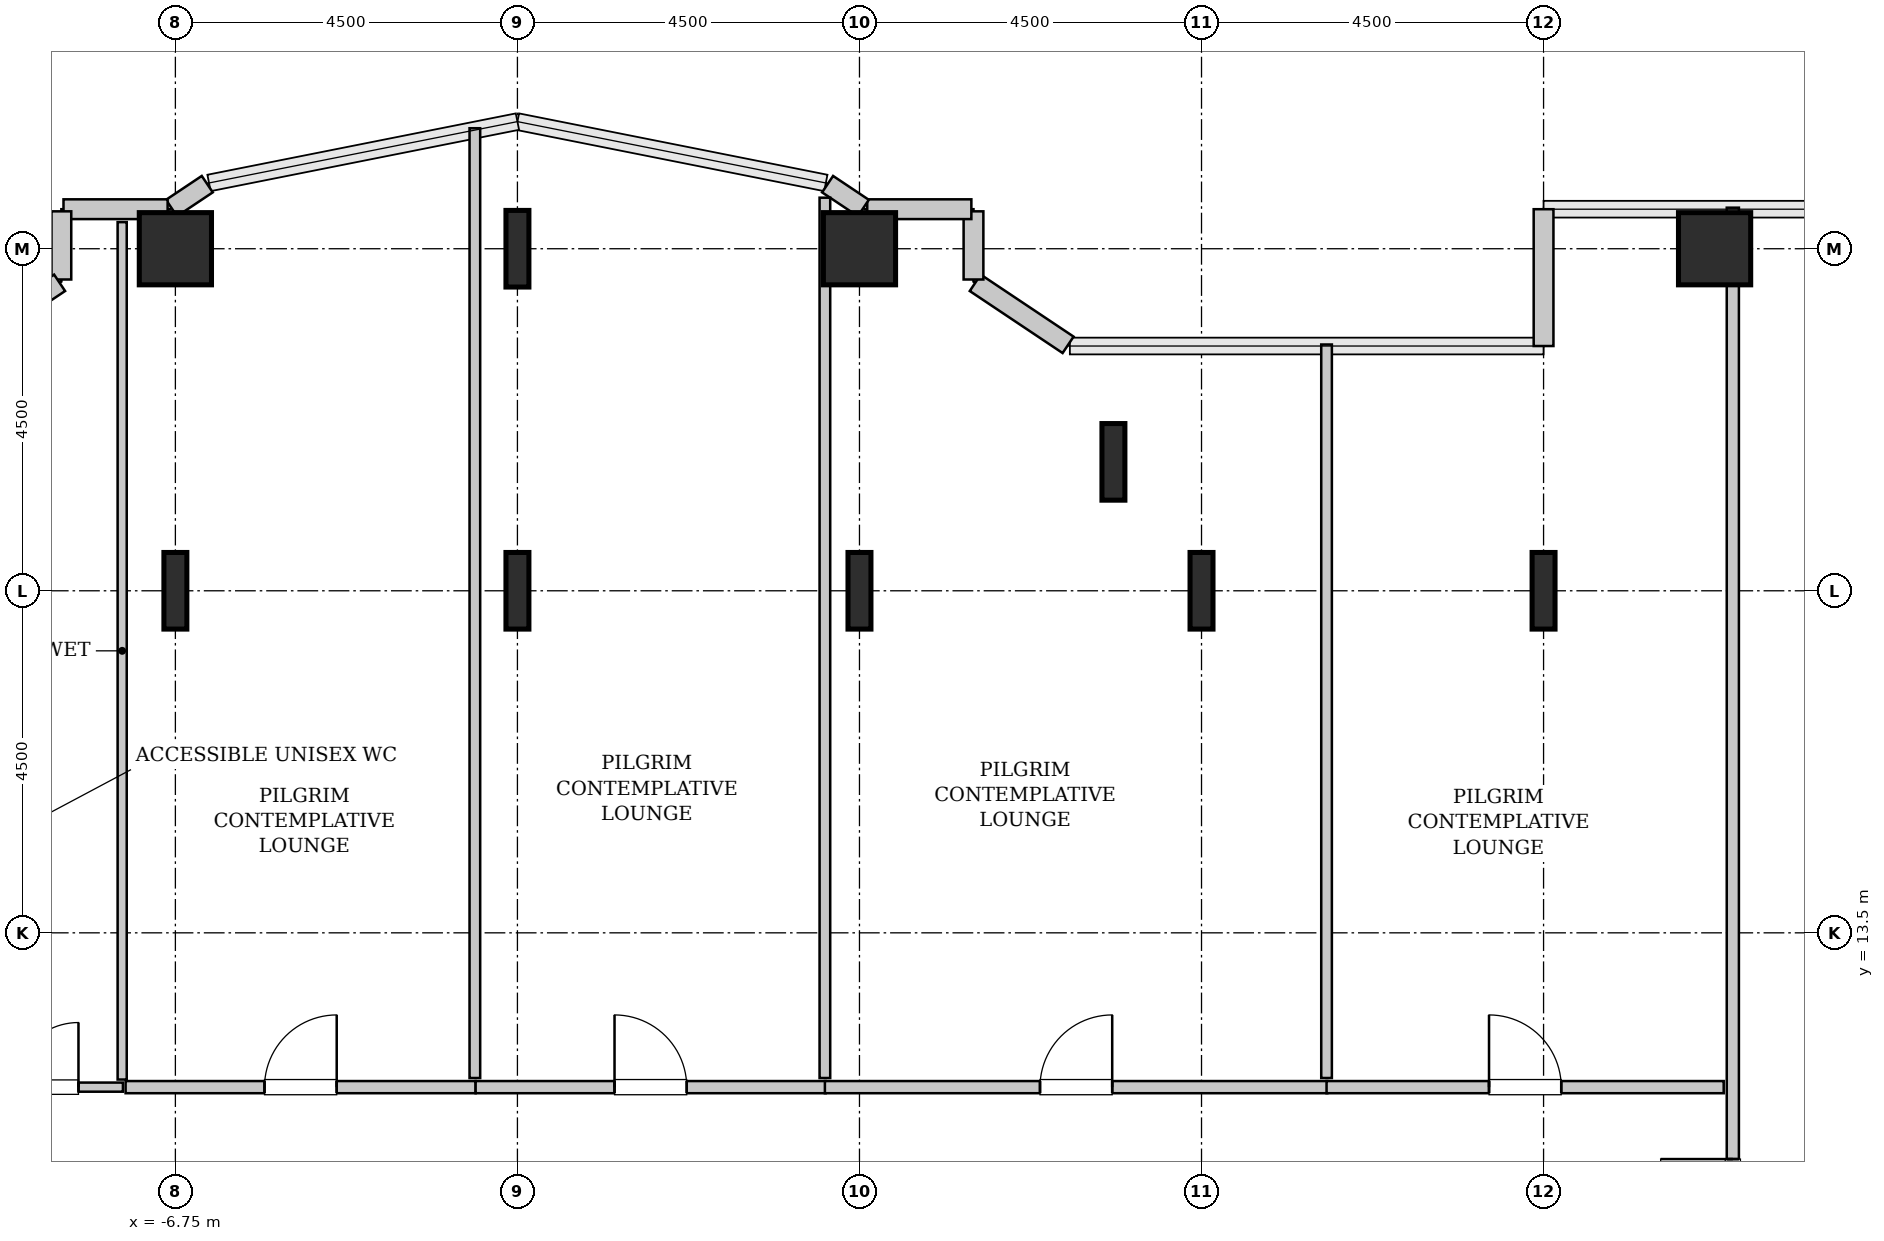
"""IFC4 building model, lengths in metres.
Left out: names, types, materials, properties, quantities, classifications, styles, units other than length and angle.
Written with IfcOpenShell. Run it as: python <this file> out.ifc"""

import sys

from ifc_helpers import new_model, si_unit, direction, frame, frame_2d, origin, origin_2d, place, context, subcontext, project, spatial, rectangle, hollow_rectangle, i_section, extrude, source, transform, mapped, element, fill, save


model = new_model("IFC4")
c1 = context("Model", 3, precision=1e-05, world=origin(), true_north=direction((0.0, 1.0)))
c2 = subcontext(c1, "Body", "Model", "MODEL_VIEW")
j1 = project(units=[si_unit("LENGTHUNIT", "METRE"), si_unit("PLANEANGLEUNIT", "RADIAN")], contexts=[c1])
p1 = place(None, origin())
s1 = spatial("IfcSite", under=j1, at=p1, CompositionType="ELEMENT")
p2 = place(p1, origin())
s2 = spatial("IfcBuilding", under=s1, at=p2, CompositionType="ELEMENT")
p3 = place(p2, frame((0.0, 0.0, 74.8)))
s3 = spatial("IfcBuildingStorey", under=s2, at=p3, CompositionType="ELEMENT", Elevation=74.8)
m1 = source(origin(), c2, "Body", "SweptSolid", [
    extrude(i_section(OverallWidth=0.302, OverallDepth=1.008, WebThickness=0.021, FlangeThickness=0.04, FilletRadius=0.03, at=origin_2d()), origin(), (0.0, 0.0, 1.0), 3.8),
])
p4 = place(p3, frame((-6.75, 18.0, 0.0), z_axis=(0.0, 0.0, 1.0), x_axis=(1.0, 0.0, 0.0)))
e1 = element("IfcColumn", 1, at=p4, inside=s3, PredefinedType="COLUMN", context=c2, shape_type="MappedRepresentation", body=[
    mapped(m1, transform((0.0, 0.0, 0.0), x_axis=(1.0, 0.0, 0.0), y_axis=(0.0, 1.0, 0.0), z_axis=(0.0, 0.0, 1.0), scale=1.0)),
])
m2 = source(origin(), c2, "Body", "SweptSolid", [
    extrude(hollow_rectangle(XDim=0.95, YDim=0.95, WallThickness=0.045, InnerFilletRadius=0.045, OuterFilletRadius=0.09, at=origin_2d()), origin(), (0.0, 0.0, 1.0), 3.8),
])
p5 = place(p3, frame((-6.75, 22.5, 0.0), z_axis=(0.0, 0.0, 1.0), x_axis=(1.0, 0.0, 0.0)))
e2 = element("IfcColumn", 2, at=p5, inside=s3, PredefinedType="COLUMN", context=c2, shape_type="MappedRepresentation", body=[
    mapped(m2, transform((0.0, 0.0, 0.0), x_axis=(1.0, 0.0, 0.0), y_axis=(0.0, 1.0, 0.0), z_axis=(0.0, 0.0, 1.0), scale=1.0)),
])
for number, where, z_axis, x_axis in (
    (3, (-2.25, 18.0, 0.0), (0.0, 0.0, 1.0), (1.0, 0.0, 0.0)),
    (4, (-2.25, 22.5, 0.0), (0.0, 0.0, 1.0), (1.0, 0.0, 0.0)),
    (5, (2.25, 18.0, 0.0), (0.0, 0.0, 1.0), (1.0, 0.0, 0.0)),
):
    element("IfcColumn", number, at=place(p3, frame(where, z_axis=z_axis, x_axis=x_axis)), inside=s3, PredefinedType="COLUMN", context=c2, shape_type="MappedRepresentation", body=[
        mapped(m1, transform((0.0, 0.0, 0.0), x_axis=(1.0, 0.0, 0.0), y_axis=(0.0, 1.0, 0.0), z_axis=(0.0, 0.0, 1.0), scale=1.0)),
    ])
p6 = place(p3, frame((2.25, 22.5, 0.0), z_axis=(0.0, 0.0, 1.0), x_axis=(1.0, 0.0, 0.0)))
e6 = element("IfcColumn", 6, at=p6, inside=s3, PredefinedType="COLUMN", context=c2, shape_type="MappedRepresentation", body=[
    mapped(m2, transform((0.0, 0.0, 0.0), x_axis=(1.0, 0.0, 0.0), y_axis=(0.0, 1.0, 0.0), z_axis=(0.0, 0.0, 1.0), scale=1.0)),
])
for number, where, z_axis, x_axis in (
    (7, (5.591, 19.696, 0.0), (0.0, 0.0, 1.0), (1.0, 0.0, 0.0)),
    (8, (6.75, 18.0, 0.0), (0.0, 0.0, 1.0), (1.0, 0.0, 0.0)),
    (9, (11.25, 18.0, 0.0), (0.0, 0.0, 1.0), (1.0, 0.0, 0.0)),
):
    element("IfcColumn", number, at=place(p3, frame(where, z_axis=z_axis, x_axis=x_axis)), inside=s3, PredefinedType="COLUMN", context=c2, shape_type="MappedRepresentation", body=[
        mapped(m1, transform((0.0, 0.0, 0.0), x_axis=(1.0, 0.0, 0.0), y_axis=(0.0, 1.0, 0.0), z_axis=(0.0, 0.0, 1.0), scale=1.0)),
    ])
p7 = place(p3, frame((13.5, 22.5, 0.0), z_axis=(0.0, 0.0, 1.0), x_axis=(1.0, 0.0, 0.0)))
e10 = element("IfcColumn", 10, at=p7, inside=s3, PredefinedType="COLUMN", context=c2, shape_type="MappedRepresentation", body=[
    mapped(m2, transform((0.0, 0.0, 0.0), x_axis=(1.0, 0.0, 0.0), y_axis=(0.0, 1.0, 0.0), z_axis=(0.0, 0.0, 1.0), scale=1.0)),
])
m3 = source(origin(), c2, "Body", "SweptSolid", [
    extrude(rectangle(XDim=1.8, YDim=0.26, at=frame_2d((0.9, 0.0))), origin(), (0.0, 0.0, 1.0), 3.55),
])
p8 = place(p3, frame((11.25, 23.02, 0.0), z_axis=(0.0, 0.0, 1.0), x_axis=(0.0, -1.0, 0.0)))
e11 = element("IfcWall", 11, at=p8, inside=s3, PredefinedType="SOLIDWALL", context=c2, shape_type="MappedRepresentation", body=[
    mapped(m3, transform((0.0, 0.0, 0.0), x_axis=(1.0, 0.0, 0.0), y_axis=(0.0, 1.0, 0.0), z_axis=(0.0, 0.0, 1.0), scale=1.0)),
])
m4 = source(origin(), c2, "Body", "SweptSolid", [
    extrude(rectangle(XDim=1.469, YDim=0.26, at=frame_2d((0.734, 0.0))), origin(), (0.0, 0.0, 1.0), 3.55),
])
p9 = place(p3, frame((4.995, 21.236, 0.0), z_axis=(0.0, 0.0, 1.0), x_axis=(-0.831461760506, 0.555581983884, 0.0)))
e12 = element("IfcWall", 12, at=p9, inside=s3, PredefinedType="SOLIDWALL", context=c2, shape_type="MappedRepresentation", body=[
    mapped(m4, transform((0.0, 0.0, 0.0), x_axis=(1.0, 0.0, 0.0), y_axis=(0.0, 1.0, 0.0), z_axis=(0.0, 0.0, 1.0), scale=1.0)),
])
m5 = source(origin(), c2, "Body", "SweptSolid", [
    extrude(rectangle(XDim=0.897, YDim=0.26, at=frame_2d((0.448, 0.0))), origin(), (0.0, 0.0, 1.0), 3.55),
])
p10 = place(p3, frame((3.75, 22.095, 0.0), z_axis=(0.0, 0.0, 1.0), x_axis=(0.0, 1.0, 0.0)))
e13 = element("IfcWall", 13, at=p10, inside=s3, PredefinedType="SOLIDWALL", context=c2, shape_type="MappedRepresentation", body=[
    mapped(m5, transform((0.0, 0.0, 0.0), x_axis=(1.0, 0.0, 0.0), y_axis=(0.0, 1.0, 0.0), z_axis=(0.0, 0.0, 1.0), scale=1.0)),
])
m6 = source(origin(), c2, "Body", "SweptSolid", [
    extrude(rectangle(XDim=1.37, YDim=0.26, at=frame_2d((0.685, 0.0))), origin(), (0.0, 0.0, 1.0), 3.55),
])
p11 = place(p3, frame((3.722, 23.02, 0.0), z_axis=(0.0, 0.0, 1.0), x_axis=(-1.0, 0.0, 0.0)))
e14 = element("IfcWall", 14, at=p11, inside=s3, PredefinedType="SOLIDWALL", context=c2, shape_type="MappedRepresentation", body=[
    mapped(m6, transform((0.0, 0.0, 0.0), x_axis=(1.0, 0.0, 0.0), y_axis=(0.0, 1.0, 0.0), z_axis=(0.0, 0.0, 1.0), scale=1.0)),
])
m7 = source(origin(), c2, "Body", "SweptSolid", [
    extrude(rectangle(XDim=0.565, YDim=0.26, at=frame_2d((0.283, 0.0))), origin(), (0.0, 0.0, 1.0), 3.55),
])
for number, where, z_axis, x_axis in (
    (15, (2.301, 23.036, 0.0), (0.0, 0.0, 1.0), (-0.832, 0.555, 0.0)),
    (16, (-6.331, 23.35, 0.0), (0.0, 0.0, 1.0), (-0.832, -0.555, 0.0)),
):
    element("IfcWall", number, at=place(p3, frame(where, z_axis=z_axis, x_axis=x_axis)), inside=s3, PredefinedType="SOLIDWALL", context=c2, shape_type="MappedRepresentation", body=[
        mapped(m7, transform((0.0, 0.0, 0.0), x_axis=(1.0, 0.0, 0.0), y_axis=(0.0, 1.0, 0.0), z_axis=(0.0, 0.0, 1.0), scale=1.0)),
    ])
p12 = place(p3, frame((-6.852, 23.02, 0.0), z_axis=(0.0, 0.0, 1.0), x_axis=(-1.0, 0.0, 0.0)))
e17 = element("IfcWall", 17, at=p12, inside=s3, PredefinedType="SOLIDWALL", context=c2, shape_type="MappedRepresentation", body=[
    mapped(m6, transform((0.0, 0.0, 0.0), x_axis=(1.0, 0.0, 0.0), y_axis=(0.0, 1.0, 0.0), z_axis=(0.0, 0.0, 1.0), scale=1.0)),
])
p13 = place(p3, frame((-8.25, 22.992, 0.0), z_axis=(0.0, 0.0, 1.0), x_axis=(0.0, -1.0, 0.0)))
e18 = element("IfcWall", 18, at=p13, inside=s3, PredefinedType="SOLIDWALL", context=c2, shape_type="MappedRepresentation", body=[
    mapped(m5, transform((0.0, 0.0, 0.0), x_axis=(1.0, 0.0, 0.0), y_axis=(0.0, 1.0, 0.0), z_axis=(0.0, 0.0, 1.0), scale=1.0)),
])
p14 = place(p3, frame((-8.273, 22.052, 0.0), z_axis=(0.0, 0.0, 1.0), x_axis=(-0.831461760506, -0.555581983884, 0.0)))
e19 = element("IfcWall", 19, at=p14, inside=s3, PredefinedType="SOLIDWALL", context=c2, shape_type="MappedRepresentation", body=[
    mapped(m4, transform((0.0, 0.0, 0.0), x_axis=(1.0, 0.0, 0.0), y_axis=(0.0, 1.0, 0.0), z_axis=(0.0, 0.0, 1.0), scale=1.0)),
])
m8 = source(origin(), c2, "Body", "SweptSolid", [
    extrude(rectangle(XDim=2.02, YDim=0.12, at=frame_2d((1.01, 0.0))), origin(), (0.0, 0.0, 1.0), 3.535),
])
p15 = place(p3, frame((-9.46, 11.47, 0.0), z_axis=(0.0, 0.0, 1.0), x_axis=(1.0, 0.0, 0.0)))
e20 = element("IfcWall", 20, at=p15, inside=s3, PredefinedType="PLUMBINGWALL", context=c2, shape_type="MappedRepresentation", body=[
    mapped(m8, transform((0.0, 0.0, 0.0), x_axis=(1.0, 0.0, 0.0), y_axis=(0.0, 1.0, 0.0), z_axis=(0.0, 0.0, 1.0), scale=1.0)),
])
p16 = place(p15, frame((0.585, 0.0, 0.0)))
e21 = element("IfcOpeningElement", 21, at=p16, cuts=e20, PredefinedType="OPENING", context=c2, shape_type="SweptSolid", body=[
    extrude(rectangle(XDim=0.85, YDim=2.1, at=frame_2d((0.425, 1.05))), frame((0.0, 0.07, 0.0), z_axis=(0.0, -1.0, 0.0), x_axis=(1.0, 0.0, 0.0)), (0.0, 0.0, 1.0), 0.14),
])
m9 = source(origin(), c2, "Body", "SweptSolid", [
    extrude(rectangle(XDim=11.28, YDim=0.12, at=frame_2d((5.64, 0.0))), origin(), (0.0, 0.0, 1.0), 3.535),
])
p17 = place(p3, frame((-7.45, 11.57, 0.0), z_axis=(0.0, 0.0, 1.0), x_axis=(0.0, 1.0, 0.0)))
e22 = element("IfcWall", 22, at=p17, inside=s3, PredefinedType="PLUMBINGWALL", context=c2, shape_type="MappedRepresentation", body=[
    mapped(m9, transform((0.0, 0.0, 0.0), x_axis=(1.0, 0.0, 0.0), y_axis=(0.0, 1.0, 0.0), z_axis=(0.0, 0.0, 1.0), scale=1.0)),
])
m10 = source(origin(), c2, "Body", "SweptSolid", [
    extrude(rectangle(XDim=14.453, YDim=0.16, at=frame_2d((7.226, 0.0))), origin(), (0.0, 0.0, 1.0), 3.535),
])
p18 = place(p3, frame((13.74, 8.587, 0.0), z_axis=(0.0, 0.0, 1.0), x_axis=(0.0, 1.0, 0.0)))
e23 = element("IfcWall", 23, at=p18, inside=s3, PredefinedType="PARTITIONING", context=c2, shape_type="MappedRepresentation", body=[
    mapped(m10, transform((0.0, 0.0, 0.0), x_axis=(1.0, 0.0, 0.0), y_axis=(0.0, 1.0, 0.0), z_axis=(0.0, 0.0, 1.0), scale=1.0)),
])
p19 = place(p18, frame((0.986, 0.0, 0.0)))
e24 = element("IfcOpeningElement", 24, at=p19, cuts=e23, PredefinedType="OPENING", context=c2, shape_type="SweptSolid", body=[
    extrude(rectangle(XDim=0.95, YDim=2.1, at=frame_2d((0.475, 1.05))), frame((0.0, 0.09, 0.0), z_axis=(0.0, -1.0, 0.0), x_axis=(1.0, 0.0, 0.0)), (0.0, 0.0, 1.0), 0.18),
])
m11 = source(origin(), c2, "Body", "SweptSolid", [
    extrude(rectangle(XDim=4.605, YDim=0.16, at=frame_2d((2.302, 0.0))), origin(), (0.0, 0.0, 1.0), 3.535),
])
p20 = place(p3, frame((-7.405, 11.47, 0.0), z_axis=(0.0, 0.0, 1.0), x_axis=(1.0, 0.0, 0.0)))
e25 = element("IfcWall", 25, at=p20, inside=s3, PredefinedType="PARTITIONING", context=c2, shape_type="MappedRepresentation", body=[
    mapped(m11, transform((0.0, 0.0, 0.0), x_axis=(1.0, 0.0, 0.0), y_axis=(0.0, 1.0, 0.0), z_axis=(0.0, 0.0, 1.0), scale=1.0)),
])
p21 = place(p20, frame((1.827, 0.0, 0.0)))
e26 = element("IfcOpeningElement", 26, at=p21, cuts=e25, PredefinedType="OPENING", context=c2, shape_type="SweptSolid", body=[
    extrude(rectangle(XDim=0.95, YDim=2.1, at=frame_2d((0.475, 1.05))), frame((0.0, 0.09, 0.0), z_axis=(0.0, -1.0, 0.0), x_axis=(1.0, 0.0, 0.0)), (0.0, 0.0, 1.0), 0.18),
])
m12 = source(origin(), c2, "Body", "SweptSolid", [
    extrude(rectangle(XDim=12.495, YDim=0.14, at=frame_2d((6.248, 0.0))), origin(), (0.0, 0.0, 1.0), 3.535),
])
p22 = place(p3, frame((-2.81, 11.59, 0.0), z_axis=(0.0, 0.0, 1.0), x_axis=(0.0, 1.0, 0.0)))
e27 = element("IfcWall", 27, at=p22, inside=s3, PredefinedType="PARTITIONING", context=c2, shape_type="MappedRepresentation", body=[
    mapped(m12, transform((0.0, 0.0, 0.0), x_axis=(1.0, 0.0, 0.0), y_axis=(0.0, 1.0, 0.0), z_axis=(0.0, 0.0, 1.0), scale=1.0)),
])
p23 = place(p3, frame((-2.8, 11.47, 0.0), z_axis=(0.0, 0.0, 1.0), x_axis=(1.0, 0.0, 0.0)))
e28 = element("IfcWall", 28, at=p23, inside=s3, PredefinedType="PARTITIONING", context=c2, shape_type="MappedRepresentation", body=[
    mapped(m11, transform((0.0, 0.0, 0.0), x_axis=(1.0, 0.0, 0.0), y_axis=(0.0, 1.0, 0.0), z_axis=(0.0, 0.0, 1.0), scale=1.0)),
])
p24 = place(p23, frame((1.827, 0.0, 0.0)))
e29 = element("IfcOpeningElement", 29, at=p24, cuts=e28, PredefinedType="OPENING", context=c2, shape_type="SweptSolid", body=[
    extrude(rectangle(XDim=0.95, YDim=2.1, at=frame_2d((0.475, 1.05))), frame((0.0, 0.09, 0.0), z_axis=(0.0, -1.0, 0.0), x_axis=(1.0, 0.0, 0.0)), (0.0, 0.0, 1.0), 0.18),
])
m13 = source(origin(), c2, "Body", "SweptSolid", [
    extrude(rectangle(XDim=11.581, YDim=0.14, at=frame_2d((5.791, 0.0))), origin(), (0.0, 0.0, 1.0), 2.825),
])
p25 = place(p3, frame((1.795, 11.59, 0.0), z_axis=(0.0, 0.0, 1.0), x_axis=(0.0, 1.0, 0.0)))
e30 = element("IfcWall", 30, at=p25, inside=s3, PredefinedType="PARTITIONING", context=c2, shape_type="MappedRepresentation", body=[
    mapped(m13, transform((0.0, 0.0, 0.0), x_axis=(1.0, 0.0, 0.0), y_axis=(0.0, 1.0, 0.0), z_axis=(0.0, 0.0, 1.0), scale=1.0)),
])
m14 = source(origin(), c2, "Body", "SweptSolid", [
    extrude(rectangle(XDim=6.61, YDim=0.16, at=frame_2d((3.305, 0.0))), origin(), (0.0, 0.0, 1.0), 3.535),
])
p26 = place(p3, frame((1.795, 11.47, 0.0), z_axis=(0.0, 0.0, 1.0), x_axis=(1.0, 0.0, 0.0)))
e31 = element("IfcWall", 31, at=p26, inside=s3, PredefinedType="PARTITIONING", context=c2, shape_type="MappedRepresentation", body=[
    mapped(m14, transform((0.0, 0.0, 0.0), x_axis=(1.0, 0.0, 0.0), y_axis=(0.0, 1.0, 0.0), z_axis=(0.0, 0.0, 1.0), scale=1.0)),
])
p27 = place(p26, frame((2.83, 0.0, 0.0)))
e32 = element("IfcOpeningElement", 32, at=p27, cuts=e31, PredefinedType="OPENING", context=c2, shape_type="SweptSolid", body=[
    extrude(rectangle(XDim=0.95, YDim=2.1, at=frame_2d((0.475, 1.05))), frame((0.0, 0.09, 0.0), z_axis=(0.0, -1.0, 0.0), x_axis=(1.0, 0.0, 0.0)), (0.0, 0.0, 1.0), 0.18),
])
m15 = source(origin(), c2, "Body", "SweptSolid", [
    extrude(rectangle(XDim=9.65, YDim=0.14, at=frame_2d((4.825, 0.0))), origin(), (0.0, 0.0, 1.0), 3.535),
])
p28 = place(p3, frame((8.395, 11.59, 0.0), z_axis=(0.0, 0.0, 1.0), x_axis=(0.0, 1.0, 0.0)))
e33 = element("IfcWall", 33, at=p28, inside=s3, PredefinedType="PARTITIONING", context=c2, shape_type="MappedRepresentation", body=[
    mapped(m15, transform((0.0, 0.0, 0.0), x_axis=(1.0, 0.0, 0.0), y_axis=(0.0, 1.0, 0.0), z_axis=(0.0, 0.0, 1.0), scale=1.0)),
])
m16 = source(origin(), c2, "Body", "SweptSolid", [
    extrude(rectangle(XDim=5.225, YDim=0.16, at=frame_2d((2.613, 0.0))), origin(), (0.0, 0.0, 1.0), 3.535),
])
p29 = place(p3, frame((8.395, 11.47, 0.0), z_axis=(0.0, 0.0, 1.0), x_axis=(1.0, 0.0, 0.0)))
e34 = element("IfcWall", 34, at=p29, inside=s3, PredefinedType="PARTITIONING", context=c2, shape_type="MappedRepresentation", body=[
    mapped(m16, transform((0.0, 0.0, 0.0), x_axis=(1.0, 0.0, 0.0), y_axis=(0.0, 1.0, 0.0), z_axis=(0.0, 0.0, 1.0), scale=1.0)),
])
p30 = place(p29, frame((2.137, 0.0, 0.0)))
e35 = element("IfcOpeningElement", 35, at=p30, cuts=e34, PredefinedType="OPENING", context=c2, shape_type="SweptSolid", body=[
    extrude(rectangle(XDim=0.95, YDim=2.1, at=frame_2d((0.475, 1.05))), frame((0.0, 0.09, 0.0), z_axis=(0.0, -1.0, 0.0), x_axis=(1.0, 0.0, 0.0)), (0.0, 0.0, 1.0), 0.18),
])
m17 = source(origin(), c2, "Body", "SweptSolid", [
    extrude(rectangle(XDim=0.85, YDim=2.1, at=frame_2d((0.425, 1.05))), frame((0.0, 0.025, 0.0), z_axis=(0.0, -1.0, 0.0), x_axis=(1.0, 0.0, 0.0)), (0.0, 0.0, 1.0), 0.05),
])
p31 = place(p16, origin())
e36 = element("IfcDoor", 36, at=p31, inside=s3, OperationType="SINGLE_SWING_RIGHT", PredefinedType="DOOR", context=c2, shape_type="MappedRepresentation", body=[
    mapped(m17, transform((0.0, 0.0, 0.0), x_axis=(1.0, 0.0, 0.0), y_axis=(0.0, 1.0, 0.0), z_axis=(0.0, 0.0, 1.0), scale=1.0)),
])
fill(e21, e36)
m18 = source(origin(), c2, "Body", "SweptSolid", [
    extrude(rectangle(XDim=0.95, YDim=2.1, at=frame_2d((0.475, 1.05))), frame((0.0, 0.025, 0.0), z_axis=(0.0, -1.0, 0.0), x_axis=(1.0, 0.0, 0.0)), (0.0, 0.0, 1.0), 0.05),
])
p32 = place(p19, origin())
e37 = element("IfcDoor", 37, at=p32, inside=s3, OperationType="SINGLE_SWING_RIGHT", PredefinedType="DOOR", context=c2, shape_type="MappedRepresentation", body=[
    mapped(m18, transform((0.0, 0.0, 0.0), x_axis=(1.0, 0.0, 0.0), y_axis=(0.0, 1.0, 0.0), z_axis=(0.0, 0.0, 1.0), scale=1.0)),
])
fill(e24, e37)
p33 = place(p21, origin())
e38 = element("IfcDoor", 38, at=p33, inside=s3, OperationType="SINGLE_SWING_RIGHT", PredefinedType="DOOR", context=c2, shape_type="MappedRepresentation", body=[
    mapped(m18, transform((0.0, 0.0, 0.0), x_axis=(1.0, 0.0, 0.0), y_axis=(0.0, 1.0, 0.0), z_axis=(0.0, 0.0, 1.0), scale=1.0)),
])
fill(e26, e38)
p34 = place(p24, origin())
e39 = element("IfcDoor", 39, at=p34, inside=s3, OperationType="SINGLE_SWING_LEFT", PredefinedType="DOOR", context=c2, shape_type="MappedRepresentation", body=[
    mapped(m18, transform((0.0, 0.0, 0.0), x_axis=(1.0, 0.0, 0.0), y_axis=(0.0, 1.0, 0.0), z_axis=(0.0, 0.0, 1.0), scale=1.0)),
])
fill(e29, e39)
p35 = place(p27, origin())
e40 = element("IfcDoor", 40, at=p35, inside=s3, OperationType="SINGLE_SWING_RIGHT", PredefinedType="DOOR", context=c2, shape_type="MappedRepresentation", body=[
    mapped(m18, transform((0.0, 0.0, 0.0), x_axis=(1.0, 0.0, 0.0), y_axis=(0.0, 1.0, 0.0), z_axis=(0.0, 0.0, 1.0), scale=1.0)),
])
fill(e32, e40)
p36 = place(p30, origin())
e41 = element("IfcDoor", 41, at=p36, inside=s3, OperationType="SINGLE_SWING_LEFT", PredefinedType="DOOR", context=c2, shape_type="MappedRepresentation", body=[
    mapped(m18, transform((0.0, 0.0, 0.0), x_axis=(1.0, 0.0, 0.0), y_axis=(0.0, 1.0, 0.0), z_axis=(0.0, 0.0, 1.0), scale=1.0)),
])
fill(e35, e41)
save(model, sys.argv[1])
